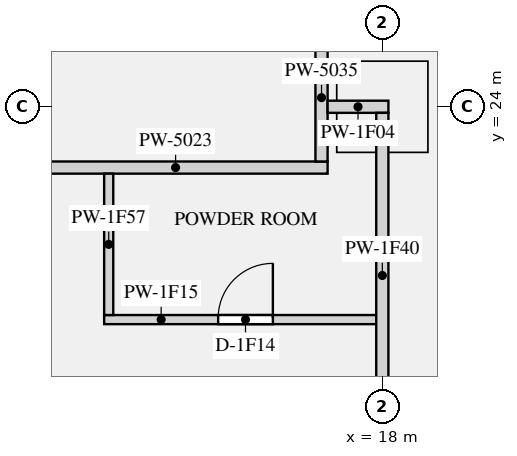
"""IFC4 building model, lengths in metres.
Left out: names, types, materials, properties, quantities, classifications, styles, units other than length and angle.
Written with IfcOpenShell. Run it as: python <this file> out.ifc"""

import sys

from ifc_helpers import new_model, si_unit, direction, frame, frame_2d, origin, origin_2d, place, context, subcontext, project, spatial, rectangle, extrude, element, fill, save


model = new_model("IFC4")
c1 = context("Model", 3, precision=1e-05, world=origin(), true_north=direction((0.0, 1.0)))
c2 = subcontext(c1, "Body", "Model", "MODEL_VIEW")
j1 = project(units=[si_unit("LENGTHUNIT", "METRE"), si_unit("PLANEANGLEUNIT", "RADIAN")], contexts=[c1])
p1 = place(None, origin())
s1 = spatial("IfcSite", under=j1, at=p1, CompositionType="ELEMENT")
p2 = place(p1, origin())
s2 = spatial("IfcBuilding", under=s1, at=p2, CompositionType="ELEMENT")
p3 = place(p2, frame((0.0, 0.0, 60.45)))
s3 = spatial("IfcBuildingStorey", under=s2, at=p3, CompositionType="ELEMENT", Elevation=60.45)
p4 = place(p3, frame((18.0, 24.0, 0.0), z_axis=(0.0, 0.0, 1.0), x_axis=(1.0, 0.0, 0.0)))
e1 = element("IfcColumn", 1, at=p4, inside=s3, PredefinedType="COLUMN", context=c2, shape_type="SweptSolid", body=[
    extrude(rectangle(XDim=1.5, YDim=1.5, at=origin_2d()), origin(), (0.0, 0.0, 1.0), 3.15),
])
p5 = place(p3, frame((12.1, 23.0, 0.0), z_axis=(0.0, 0.0, 1.0), x_axis=(1.0, 0.0, 0.0)))
e2 = element("IfcWall", 2, at=p5, inside=s3, PredefinedType="PARTITIONING", context=c2, shape_type="SweptSolid", body=[
    extrude(rectangle(XDim=5.0, YDim=0.2, at=frame_2d((2.5, 0.0))), origin(), (0.0, 0.0, 1.0), 2.83),
])
p6 = place(p3, frame((17.0, 23.1, 0.0), z_axis=(0.0, 0.0, 1.0), x_axis=(0.0, 1.0, 0.0)))
e3 = element("IfcWall", 3, at=p6, inside=s3, PredefinedType="PARTITIONING", context=c2, shape_type="SweptSolid", body=[
    extrude(rectangle(XDim=3.8, YDim=0.2, at=frame_2d((1.9, 0.0))), origin(), (0.0, 0.0, 1.0), 2.83),
])
p7 = place(p6, frame((2.1, 0.0, 0.0)))
e4 = element("IfcOpeningElement", 4, at=p7, cuts=e3, PredefinedType="OPENING", context=c2, shape_type="SweptSolid", body=[
    extrude(rectangle(XDim=1.2, YDim=2.1, at=frame_2d((0.6, 1.05))), frame((0.0, 0.11, 0.0), z_axis=(0.0, -1.0, 0.0), x_axis=(1.0, 0.0, 0.0)), (0.0, 0.0, 1.0), 0.22),
])
p8 = place(p3, frame((17.1, 24.0, 0.0), z_axis=(0.0, 0.0, 1.0), x_axis=(1.0, 0.0, 0.0)))
e5 = element("IfcWall", 5, at=p8, inside=s3, PredefinedType="PARTITIONING", context=c2, shape_type="SweptSolid", body=[
    extrude(rectangle(XDim=1.0, YDim=0.2, at=frame_2d((0.5, 0.0))), origin(), (0.0, 0.0, 1.0), 2.83),
])
p9 = place(p3, frame((13.425, 20.5, 0.0), z_axis=(0.0, 0.0, 1.0), x_axis=(1.0, 0.0, 0.0)))
e6 = element("IfcWall", 6, at=p9, inside=s3, PredefinedType="PARTITIONING", context=c2, shape_type="SweptSolid", body=[
    extrude(rectangle(XDim=4.475, YDim=0.15, at=frame_2d((2.237, 0.0))), origin(), (0.0, 0.0, 1.0), 2.83),
])
p10 = place(p9, frame((1.875, 0.0, 0.0)))
e7 = element("IfcOpeningElement", 7, at=p10, cuts=e6, PredefinedType="OPENING", context=c2, shape_type="SweptSolid", body=[
    extrude(rectangle(XDim=0.9, YDim=2.1, at=frame_2d((0.45, 1.05))), frame((0.0, 0.085, 0.0), z_axis=(0.0, -1.0, 0.0), x_axis=(1.0, 0.0, 0.0)), (0.0, 0.0, 1.0), 0.17),
])
p11 = place(p3, frame((18.0, 16.1, 0.0), z_axis=(0.0, 0.0, 1.0), x_axis=(0.0, 1.0, 0.0)))
e8 = element("IfcWall", 8, at=p11, inside=s3, PredefinedType="PARTITIONING", context=c2, shape_type="SweptSolid", body=[
    extrude(rectangle(XDim=7.8, YDim=0.2, at=frame_2d((3.9, 0.0))), origin(), (0.0, 0.0, 1.0), 2.83),
])
p12 = place(p11, frame((1.35, 0.0, 0.0)))
e9 = element("IfcOpeningElement", 9, at=p12, cuts=e8, PredefinedType="OPENING", context=c2, shape_type="SweptSolid", body=[
    extrude(rectangle(XDim=1.1, YDim=2.1, at=frame_2d((0.55, 1.05))), frame((0.0, 0.11, 0.0), z_axis=(0.0, -1.0, 0.0), x_axis=(1.0, 0.0, 0.0)), (0.0, 0.0, 1.0), 0.22),
])
p13 = place(p3, frame((13.5, 20.575, 0.0), z_axis=(0.0, 0.0, 1.0), x_axis=(0.0, 1.0, 0.0)))
e10 = element("IfcWall", 10, at=p13, inside=s3, PredefinedType="PARTITIONING", context=c2, shape_type="SweptSolid", body=[
    extrude(rectangle(XDim=2.325, YDim=0.15, at=frame_2d((1.163, 0.0))), origin(), (0.0, 0.0, 1.0), 2.83),
])
p14 = place(p10, origin())
e11 = element("IfcDoor", 11, at=p14, inside=s3, OperationType="SINGLE_SWING_RIGHT", PredefinedType="DOOR", context=c2, shape_type="SweptSolid", body=[
    extrude(rectangle(XDim=0.9, YDim=2.1, at=frame_2d((0.45, 1.05))), frame((0.0, 0.025, 0.0), z_axis=(0.0, -1.0, 0.0), x_axis=(1.0, 0.0, 0.0)), (0.0, 0.0, 1.0), 0.05),
])
fill(e7, e11)
save(model, sys.argv[1])
